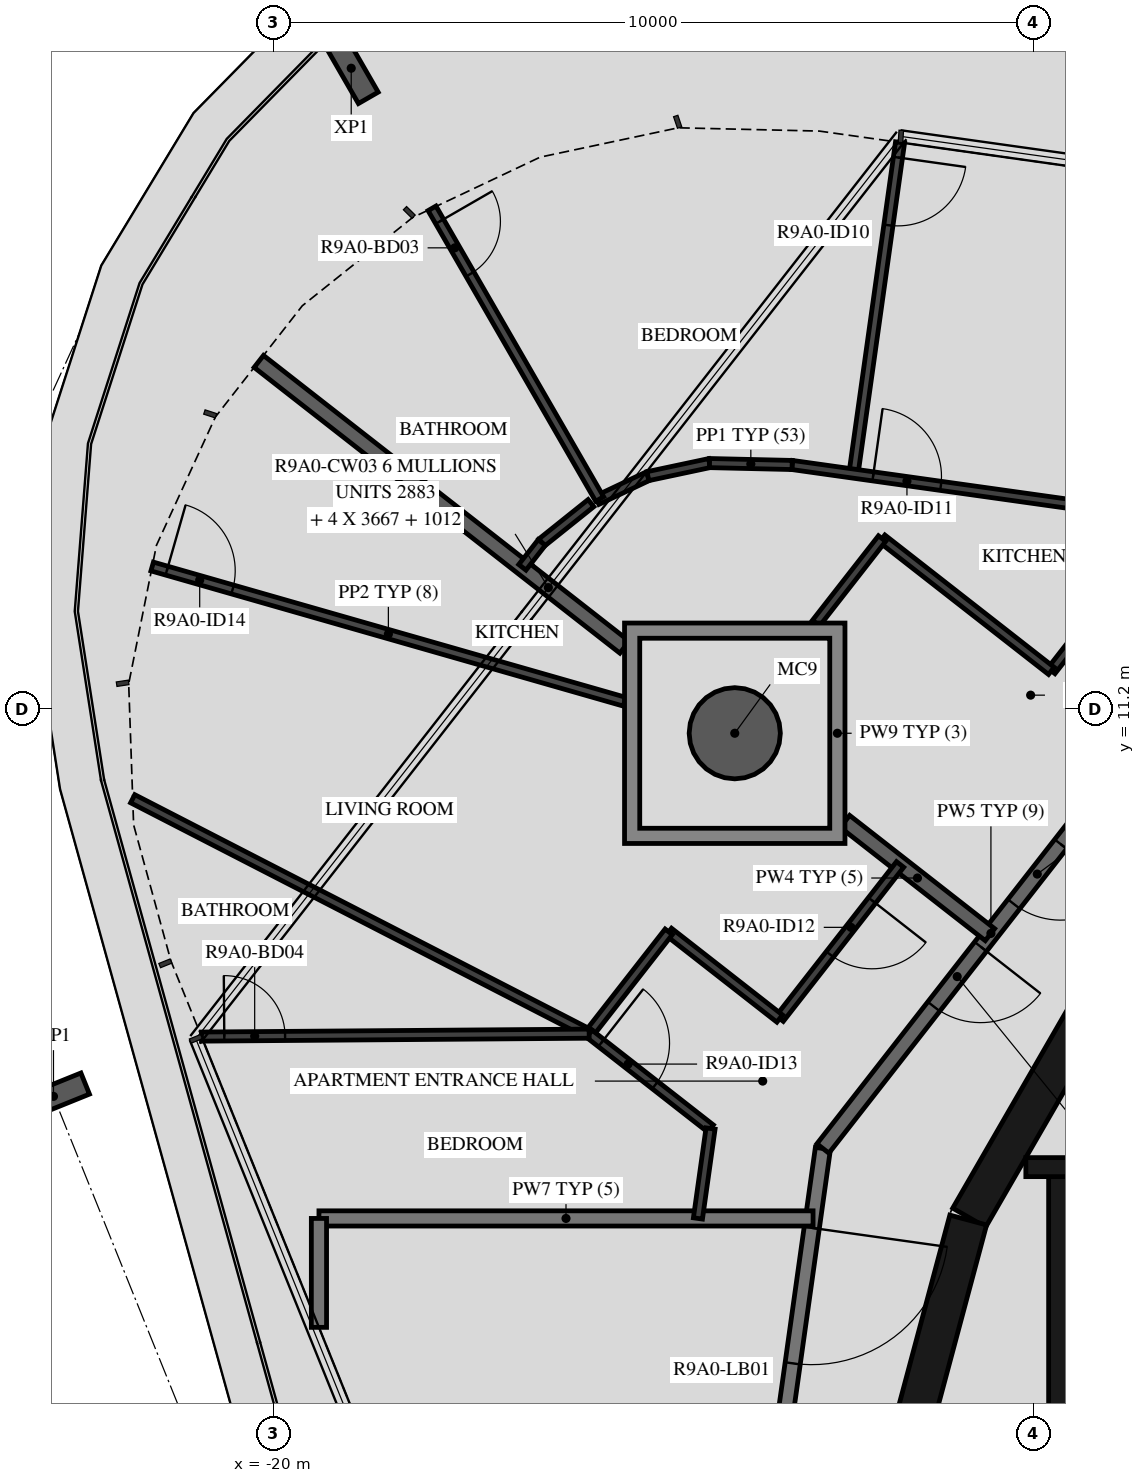
"""IFC4 building model, lengths in metres.
Left out: names, types, materials, properties, quantities, classifications, styles, units other than length and angle.
Written with IfcOpenShell. Run it as: python <this file> out.ifc"""

import sys

from ifc_helpers import new_model, si_unit, direction, frame, frame_2d, origin, origin_2d, place, context, subcontext, project, spatial, polyline, rectangle, hollow_circle, i_section, outline, extrude, element, fill, save


model = new_model("IFC4")
c1 = context("Model", 3, precision=1e-05, world=origin(), true_north=direction((0.0, 1.0)))
c2 = subcontext(c1, "Body", "Model", "MODEL_VIEW")
j1 = project(units=[si_unit("LENGTHUNIT", "METRE"), si_unit("PLANEANGLEUNIT", "RADIAN")], contexts=[c1])
p1 = place(None, origin())
s1 = spatial("IfcSite", under=j1, at=p1, CompositionType="ELEMENT")
p2 = place(p1, origin())
s2 = spatial("IfcBuilding", under=s1, at=p2, CompositionType="ELEMENT")
p3 = place(p2, frame((0.0, 0.0, 333.0)))
s3 = spatial("IfcBuildingStorey", under=s2, at=p3, CompositionType="ELEMENT", Elevation=333.0)
p4 = place(p3, frame((-13.929, 10.883, -0.45), z_axis=(0.0, 0.0, 1.0), x_axis=(1.0, 0.0, 0.0)))
e1 = element("IfcColumn", 1, at=p4, inside=s3, PredefinedType="COLUMN", context=c2, shape_type="SweptSolid", body=[
    extrude(hollow_circle(Radius=0.6, WallThickness=0.03, at=origin_2d()), origin(), (0.0, 0.0, 1.0), 3.57),
])
for number, where, z_axis, x_axis in (
    (2, (-18.976, 19.632, -0.45), (0.0, 0.0, 1.0), (0.866, 0.5, 0.0)),
    (3, (-22.893, 6.106, -0.45), (0.0, 0.0, 1.0), (-0.375, 0.927, 0.0)),
):
    element("IfcColumn", number, at=place(p3, frame(where, z_axis=z_axis, x_axis=x_axis)), inside=s3, PredefinedType="COLUMN", context=c2, shape_type="SweptSolid", body=[
        extrude(i_section(OverallWidth=0.3, OverallDepth=0.9, WebThickness=0.019, FlangeThickness=0.035, FilletRadius=0.03, at=origin_2d()), origin(), (0.0, 0.0, 1.0), 3.57),
    ])
for number, where, z_axis, x_axis in (
    (4, (-9.329, 7.137, 0.0), (0.0, 0.0, 1.0), (-0.5, -0.866, 0.0)),
    (5, (-10.858, 4.479, 0.0), (0.0, 0.0, 1.0), (-0.259, -0.966, 0.0)),
):
    element("IfcWall", number, at=place(p3, frame(where, z_axis=z_axis, x_axis=x_axis)), inside=s3, PredefinedType="SHEAR", context=c2, shape_type="SweptSolid", body=[
        extrude(rectangle(XDim=3.033, YDim=0.5, at=frame_2d((1.516, 0.0))), origin(), (0.0, 0.0, 1.0), 3.12),
    ])
p5 = place(p3, frame((-7.0, 5.175, 0.0), z_axis=(0.0, 0.0, 1.0), x_axis=(-1.0, 0.0, 0.0)))
e6 = element("IfcWall", 6, at=p5, inside=s3, PredefinedType="SHEAR", context=c2, shape_type="SweptSolid", body=[
    extrude(rectangle(XDim=3.1, YDim=0.25, at=frame_2d((1.55, 0.0))), origin(), (0.0, 0.0, 1.0), 3.12),
])
p6 = place(p3, origin())
e7 = element("IfcWall", 7, at=p6, inside=s3, PredefinedType="SHEAR", context=c2, shape_type="SweptSolid", body=[
    extrude(outline(polyline([(-9.8, 1.9), (-9.55, 1.9), (-9.55, 4.8), (-3.35, 4.8), (-3.35, 1.9), (-3.1, 1.9), (-3.1, 4.8), (3.1, 4.8), (3.1, 1.9), (3.35, 1.9), (3.35, 4.8), (5.25, 4.8), (5.25, 1.9), (5.5, 1.9), (5.5, 4.8), (7.4, 4.8), (7.4, 1.9), (7.65, 1.9), (7.65, 4.8), (9.55, 4.8), (9.55, 1.9), (9.8, 1.9), (9.8, 4.8), (9.8, 5.05), (-9.8, 5.05), (-9.8, 4.8), (-9.8, 1.9)])), origin(), (0.0, 0.0, 1.0), 3.12),
])
p7 = place(p3, frame((-12.77, 5.42, 0.0), z_axis=(0.0, 0.0, 1.0), x_axis=(-0.139155334385, -0.990270565508, 0.0)))
e8 = element("IfcWall", 8, at=p7, inside=s3, PredefinedType="STANDARD", context=c2, shape_type="SweptSolid", body=[
    extrude(rectangle(XDim=7.181, YDim=0.2, at=frame_2d((3.59, 0.0))), origin(), (0.0, 0.0, 1.0), 3.12),
])
p8 = place(p7, frame((1.055, 0.0, 0.0)))
e9 = element("IfcOpeningElement", 9, at=p8, cuts=e8, PredefinedType="OPENING", context=c2, shape_type="SweptSolid", body=[
    extrude(rectangle(XDim=1.8, YDim=2.1, at=frame_2d((0.9, 1.05))), frame((0.0, 0.11, 0.0), z_axis=(0.0, -1.0, 0.0), x_axis=(1.0, 0.0, 0.0)), (0.0, 0.0, 1.0), 0.22),
])
p9 = place(p3, frame((-8.349, 11.079, 0.0), z_axis=(0.0, 0.0, 1.0), x_axis=(-0.615669112324, -0.78800478687, 0.0)))
e10 = element("IfcWall", 10, at=p9, inside=s3, PredefinedType="STANDARD", context=c2, shape_type="SweptSolid", body=[
    extrude(rectangle(XDim=7.181, YDim=0.2, at=frame_2d((3.591, 0.0))), origin(), (0.0, 0.0, 1.0), 3.12),
])
p10 = place(p9, frame((2.1, 0.0, 0.0)))
e11 = element("IfcOpeningElement", 11, at=p10, cuts=e10, PredefinedType="OPENING", context=c2, shape_type="SweptSolid", body=[
    extrude(rectangle(XDim=1.0, YDim=2.1, at=frame_2d((0.5, 1.05))), frame((0.0, 0.11, 0.0), z_axis=(0.0, -1.0, 0.0), x_axis=(1.0, 0.0, 0.0)), (0.0, 0.0, 1.0), 0.22),
])
p11 = place(p9, frame((3.811, 0.0, 0.0)))
e12 = element("IfcOpeningElement", 12, at=p11, cuts=e10, PredefinedType="OPENING", context=c2, shape_type="SweptSolid", body=[
    extrude(rectangle(XDim=1.0, YDim=2.1, at=frame_2d((0.5, 1.05))), frame((0.0, 0.11, 0.0), z_axis=(0.0, -1.0, 0.0), x_axis=(1.0, 0.0, 0.0)), (0.0, 0.0, 1.0), 0.22),
])
p12 = place(p3, frame((-12.899, 4.5, 0.0), z_axis=(0.0, 0.0, 1.0), x_axis=(-1.0, 0.0, 0.0)))
e13 = element("IfcWall", 13, at=p12, inside=s3, PredefinedType="STANDARD", context=c2, shape_type="SweptSolid", body=[
    extrude(rectangle(XDim=6.5, YDim=0.2, at=frame_2d((3.25, 0.0))), origin(), (0.0, 0.0, 1.0), 3.12),
])
p13 = place(p3, frame((-19.4, 4.5, 0.0), z_axis=(0.0, 0.0, 1.0), x_axis=(0.0, -1.0, 0.0)))
e14 = element("IfcWall", 14, at=p13, inside=s3, PredefinedType="STANDARD", context=c2, shape_type="SweptSolid", body=[
    extrude(rectangle(XDim=1.433, YDim=0.2, at=frame_2d((0.716, 0.0))), origin(), (0.0, 0.0, 1.0), 3.12),
])
p14 = place(p3, frame((-12.479, 9.723, 0.0), z_axis=(0.0, 0.0, 1.0), x_axis=(0.788030490991, -0.615636211792, 0.0)))
e15 = element("IfcWall", 15, at=p14, inside=s3, PredefinedType="STANDARD", context=c2, shape_type="SweptSolid", body=[
    extrude(rectangle(XDim=2.42, YDim=0.2, at=frame_2d((1.21, 0.0))), origin(), (0.0, 0.0, 1.0), 3.12),
])
p15 = place(p3, frame((-20.191, 15.775, 0.0), z_axis=(0.0, 0.0, 1.0), x_axis=(0.788021948923, -0.615647145706, 0.0)))
e16 = element("IfcWall", 16, at=p15, inside=s3, PredefinedType="STANDARD", context=c2, shape_type="SweptSolid", body=[
    extrude(rectangle(XDim=6.106, YDim=0.2, at=frame_2d((3.053, 0.0))), origin(), (0.0, 0.0, 1.0), 3.12),
])
p16 = place(p3, frame((-9.283, 12.319, 0.0), z_axis=(0.0, 0.0, 1.0), x_axis=(-0.615735018346, -0.787953289975, 0.0)))
e17 = element("IfcWall", 17, at=p16, inside=s3, PredefinedType="PARTITIONING", context=c2, shape_type="SweptSolid", body=[
    extrude(rectangle(XDim=0.781, YDim=0.12, at=frame_2d((0.391, 0.0))), origin(), (0.0, 0.0, 1.0), 3.12),
])
p17 = place(p3, frame((-9.764, 11.704, 0.0), z_axis=(0.0, 0.0, 1.0), x_axis=(-0.787996873396, 0.615679240772, 0.0)))
e18 = element("IfcWall", 18, at=p17, inside=s3, PredefinedType="PARTITIONING", context=c2, shape_type="SweptSolid", body=[
    extrude(rectangle(XDim=2.826, YDim=0.12, at=frame_2d((1.413, 0.0))), origin(), (0.0, 0.0, 1.0), 3.12),
])
p18 = place(p3, frame((-11.992, 13.444, 0.0), z_axis=(0.0, 0.0, 1.0), x_axis=(-0.615593635541, -0.788063751153, 0.0)))
e19 = element("IfcWall", 19, at=p18, inside=s3, PredefinedType="PARTITIONING", context=c2, shape_type="SweptSolid", body=[
    extrude(rectangle(XDim=1.41, YDim=0.12, at=frame_2d((0.705, 0.0))), origin(), (0.0, 0.0, 1.0), 3.12),
])
p19 = place(p3, frame((-11.755, 18.656, 0.0), z_axis=(0.0, 0.0, 1.0), x_axis=(-0.13916046232, -0.990269844904, 0.0)))
e20 = element("IfcWall", 20, at=p19, inside=s3, PredefinedType="PARTITIONING", context=c2, shape_type="SweptSolid", body=[
    extrude(rectangle(XDim=4.4, YDim=0.12, at=frame_2d((2.2, 0.0))), origin(), (0.0, 0.0, 1.0), 2.73),
])
p20 = place(p19, frame((0.2, 0.0, 0.0)))
e21 = element("IfcOpeningElement", 21, at=p20, cuts=e20, PredefinedType="OPENING", context=c2, shape_type="SweptSolid", body=[
    extrude(rectangle(XDim=0.9, YDim=2.1, at=frame_2d((0.45, 1.05))), frame((0.0, 0.07, 0.0), z_axis=(0.0, -1.0, 0.0), x_axis=(1.0, 0.0, 0.0)), (0.0, 0.0, 1.0), 0.14),
])
p21 = place(p3, frame((-13.175, 14.412, 0.0), z_axis=(0.0, 0.0, 1.0), x_axis=(0.990264549393, -0.139198140128, 0.0)))
e22 = element("IfcWall", 22, at=p21, inside=s3, PredefinedType="PARTITIONING", context=c2, shape_type="SweptSolid", body=[
    extrude(rectangle(XDim=6.796, YDim=0.12, at=frame_2d((3.398, 0.0))), origin(), (0.0, 0.0, 1.0), 3.12),
])
p22 = place(p21, frame((1.075, 0.0, 0.0)))
e23 = element("IfcOpeningElement", 23, at=p22, cuts=e22, PredefinedType="OPENING", context=c2, shape_type="SweptSolid", body=[
    extrude(rectangle(XDim=0.9, YDim=2.1, at=frame_2d((0.45, 1.05))), frame((0.0, 0.07, 0.0), z_axis=(0.0, -1.0, 0.0), x_axis=(1.0, 0.0, 0.0)), (0.0, 0.0, 1.0), 0.14),
])
p23 = place(p3, frame((-15.743, 13.948, 0.0), z_axis=(0.0, 0.0, 1.0), x_axis=(0.903885078158, 0.427775368019, 0.0)))
e24 = element("IfcWall", 24, at=p23, inside=s3, PredefinedType="PARTITIONING", context=c2, shape_type="SweptSolid", body=[
    extrude(rectangle(XDim=0.742, YDim=0.12, at=frame_2d((0.371, 0.0))), origin(), (0.0, 0.0, 1.0), 3.12),
])
p24 = place(p3, frame((-15.072, 14.265, 0.0), z_axis=(0.0, 0.0, 1.0), x_axis=(0.978141630921, 0.207939774595, 0.0)))
e25 = element("IfcWall", 25, at=p24, inside=s3, PredefinedType="PARTITIONING", context=c2, shape_type="SweptSolid", body=[
    extrude(rectangle(XDim=0.829, YDim=0.12, at=frame_2d((0.415, 0.0))), origin(), (0.0, 0.0, 1.0), 3.12),
])
p25 = place(p3, frame((-14.261, 14.438, 0.0), z_axis=(0.0, 0.0, 1.0), x_axis=(0.999732237365, -0.023139869764, 0.0)))
e26 = element("IfcWall", 26, at=p25, inside=s3, PredefinedType="PARTITIONING", context=c2, shape_type="SweptSolid", body=[
    extrude(rectangle(XDim=1.087, YDim=0.12, at=frame_2d((0.543, 0.0))), origin(), (0.0, 0.0, 1.0), 3.12),
])
p26 = place(p3, frame((-17.912, 17.789, 0.0), z_axis=(0.0, 0.0, 1.0), x_axis=(0.499601164034, -0.866255549417, 0.0)))
e27 = element("IfcWall", 27, at=p26, inside=s3, PredefinedType="PARTITIONING", context=c2, shape_type="SweptSolid", body=[
    extrude(rectangle(XDim=4.415, YDim=0.12, at=frame_2d((2.207, 0.0))), origin(), (0.0, 0.0, 1.0), 2.73),
])
p27 = place(p26, frame((0.2, 0.0, 0.0)))
e28 = element("IfcOpeningElement", 28, at=p27, cuts=e27, PredefinedType="OPENING", context=c2, shape_type="SweptSolid", body=[
    extrude(rectangle(XDim=0.8, YDim=2.1, at=frame_2d((0.4, 1.05))), frame((0.0, 0.07, 0.0), z_axis=(0.0, -1.0, 0.0), x_axis=(1.0, 0.0, 0.0)), (0.0, 0.0, 1.0), 0.14),
])
p28 = place(p3, frame((-15.821, 13.91, 0.0), z_axis=(0.0, 0.0, 1.0), x_axis=(-0.780840072472, -0.624730967074, 0.0)))
e29 = element("IfcWall", 29, at=p28, inside=s3, PredefinedType="PARTITIONING", context=c2, shape_type="SweptSolid", body=[
    extrude(rectangle(XDim=0.829, YDim=0.12, at=frame_2d((0.415, 0.0))), origin(), (0.0, 0.0, 1.0), 3.12),
])
p29 = place(p3, frame((-16.469, 13.393, 0.0), z_axis=(0.0, 0.0, 1.0), x_axis=(-0.615815563257, -0.787890342656, 0.0)))
e30 = element("IfcWall", 30, at=p29, inside=s3, PredefinedType="PARTITIONING", context=c2, shape_type="SweptSolid", body=[
    extrude(rectangle(XDim=0.414, YDim=0.12, at=frame_2d((0.207, 0.0))), origin(), (0.0, 0.0, 1.0), 3.12),
])
p30 = place(p3, frame((-11.754, 9.157, 0.0), z_axis=(0.0, 0.0, 1.0), x_axis=(-0.615568539365, -0.788083354312, 0.0)))
e31 = element("IfcWall", 31, at=p30, inside=s3, PredefinedType="PARTITIONING", context=c2, shape_type="SweptSolid", body=[
    extrude(rectangle(XDim=2.573, YDim=0.12, at=frame_2d((1.286, 0.0))), origin(), (0.0, 0.0, 1.0), 3.12),
])
p31 = place(p30, frame((0.6, 0.0, 0.0)))
e32 = element("IfcOpeningElement", 32, at=p31, cuts=e31, PredefinedType="OPENING", context=c2, shape_type="SweptSolid", body=[
    extrude(rectangle(XDim=0.9, YDim=2.1, at=frame_2d((0.45, 1.05))), frame((0.0, 0.07, 0.0), z_axis=(0.0, -1.0, 0.0), x_axis=(1.0, 0.0, 0.0)), (0.0, 0.0, 1.0), 0.14),
])
p32 = place(p3, frame((-13.338, 7.129, 0.0), z_axis=(0.0, 0.0, 1.0), x_axis=(-0.787938483233, 0.615753965997, 0.0)))
e33 = element("IfcWall", 33, at=p32, inside=s3, PredefinedType="PARTITIONING", context=c2, shape_type="SweptSolid", body=[
    extrude(rectangle(XDim=1.853, YDim=0.12, at=frame_2d((0.927, 0.0))), origin(), (0.0, 0.0, 1.0), 3.12),
])
p33 = place(p3, frame((-14.798, 8.271, 0.0), z_axis=(0.0, 0.0, 1.0), x_axis=(-0.615669123866, -0.788004777852, 0.0)))
e34 = element("IfcWall", 34, at=p33, inside=s3, PredefinedType="PARTITIONING", context=c2, shape_type="SweptSolid", body=[
    extrude(rectangle(XDim=1.7, YDim=0.12, at=frame_2d((0.85, 0.0))), origin(), (0.0, 0.0, 1.0), 3.12),
])
p34 = place(p3, frame((-15.845, 6.931, 0.0), z_axis=(0.0, 0.0, 1.0), x_axis=(0.787962283792, -0.615723508827, 0.0)))
e35 = element("IfcWall", 35, at=p34, inside=s3, PredefinedType="PARTITIONING", context=c2, shape_type="SweptSolid", body=[
    extrude(rectangle(XDim=2.027, YDim=0.12, at=frame_2d((1.013, 0.0))), origin(), (0.0, 0.0, 1.0), 3.12),
])
p35 = place(p34, frame((0.2, 0.0, 0.0)))
e36 = element("IfcOpeningElement", 36, at=p35, cuts=e35, PredefinedType="OPENING", context=c2, shape_type="SweptSolid", body=[
    extrude(rectangle(XDim=0.9, YDim=2.1, at=frame_2d((0.45, 1.05))), frame((0.0, 0.07, 0.0), z_axis=(0.0, -1.0, 0.0), x_axis=(1.0, 0.0, 0.0)), (0.0, 0.0, 1.0), 0.14),
])
p36 = place(p3, frame((-14.248, 5.683, 0.0), z_axis=(0.0, 0.0, 1.0), x_axis=(-0.139189066398, -0.990265824814, 0.0)))
e37 = element("IfcWall", 37, at=p36, inside=s3, PredefinedType="PARTITIONING", context=c2, shape_type="SweptSolid", body=[
    extrude(rectangle(XDim=1.195, YDim=0.12, at=frame_2d((0.597, 0.0))), origin(), (0.0, 0.0, 1.0), 3.12),
])
p37 = place(p3, frame((-21.594, 13.077, 0.0), z_axis=(0.0, 0.0, 1.0), x_axis=(0.961389857774, -0.275190009576, 0.0)))
e38 = element("IfcWall", 38, at=p37, inside=s3, PredefinedType="PARTITIONING", context=c2, shape_type="SweptSolid", body=[
    extrude(rectangle(XDim=6.464, YDim=0.12, at=frame_2d((3.232, 0.0))), origin(), (0.0, 0.0, 1.0), 2.73),
])
p38 = place(p37, frame((0.2, 0.0, 0.0)))
e39 = element("IfcOpeningElement", 39, at=p38, cuts=e38, PredefinedType="OPENING", context=c2, shape_type="SweptSolid", body=[
    extrude(rectangle(XDim=0.9, YDim=2.1, at=frame_2d((0.45, 1.05))), frame((0.0, 0.07, 0.0), z_axis=(0.0, -1.0, 0.0), x_axis=(1.0, 0.0, 0.0)), (0.0, 0.0, 1.0), 0.14),
])
p39 = place(p3, frame((-21.85, 10.021, 0.0), z_axis=(0.0, 0.0, 1.0), x_axis=(0.889153763622, -0.457608549567, 0.0)))
e40 = element("IfcWall", 40, at=p39, inside=s3, PredefinedType="PARTITIONING", context=c2, shape_type="SweptSolid", body=[
    extrude(rectangle(XDim=6.754, YDim=0.12, at=frame_2d((3.377, 0.0))), origin(), (0.0, 0.0, 1.0), 3.12),
])
p40 = place(p3, frame((-20.946, 6.892, 0.0), z_axis=(0.0, 0.0, 1.0), x_axis=(0.999971403985, 0.007562487164, 0.0)))
e41 = element("IfcWall", 41, at=p40, inside=s3, PredefinedType="PARTITIONING", context=c2, shape_type="SweptSolid", body=[
    extrude(rectangle(XDim=5.101, YDim=0.12, at=frame_2d((2.55, 0.0))), origin(), (0.0, 0.0, 1.0), 3.12),
])
p41 = place(p40, frame((0.3, 0.0, 0.0)))
e42 = element("IfcOpeningElement", 42, at=p41, cuts=e41, PredefinedType="OPENING", context=c2, shape_type="SweptSolid", body=[
    extrude(rectangle(XDim=0.8, YDim=2.1, at=frame_2d((0.4, 1.05))), frame((0.0, 0.07, 0.0), z_axis=(0.0, -1.0, 0.0), x_axis=(1.0, 0.0, 0.0)), (0.0, 0.0, 1.0), 0.14),
])
p42 = place(p3, origin())
e43 = element("IfcWall", 43, at=p42, inside=s3, PredefinedType="STANDARD", context=c2, shape_type="SweptSolid", body=[
    extrude(outline(polyline([(-12.479, 12.333), (-12.479, 9.433), (-15.379, 9.433), (-15.379, 12.333), (-12.479, 12.333)]), holes=[polyline([(-15.179, 9.633), (-12.679, 9.633), (-12.679, 12.133), (-15.179, 12.133), (-15.179, 9.633)])]), origin(), (0.0, 0.0, 1.0), 3.12),
])
p43 = place(p10, origin())
e44 = element("IfcDoor", 44, at=p43, inside=s3, OperationType="SINGLE_SWING_RIGHT", PredefinedType="DOOR", context=c2, shape_type="SweptSolid", body=[
    extrude(rectangle(XDim=1.0, YDim=2.1, at=frame_2d((0.5, 1.05))), frame((0.0, 0.025, 0.0), z_axis=(0.0, -1.0, 0.0), x_axis=(1.0, 0.0, 0.0)), (0.0, 0.0, 1.0), 0.05),
])
fill(e11, e44)
p44 = place(p20, origin())
e45 = element("IfcDoor", 45, at=p44, inside=s3, OperationType="SINGLE_SWING_RIGHT", PredefinedType="DOOR", context=c2, shape_type="SweptSolid", body=[
    extrude(rectangle(XDim=0.9, YDim=2.1, at=frame_2d((0.45, 1.05))), frame((0.0, 0.025, 0.0), z_axis=(0.0, -1.0, 0.0), x_axis=(1.0, 0.0, 0.0)), (0.0, 0.0, 1.0), 0.05),
])
fill(e21, e45)
p45 = place(p27, origin())
e46 = element("IfcDoor", 46, at=p45, inside=s3, OperationType="SINGLE_SWING_RIGHT", PredefinedType="DOOR", context=c2, shape_type="SweptSolid", body=[
    extrude(rectangle(XDim=0.8, YDim=2.1, at=frame_2d((0.4, 1.05))), frame((0.0, 0.025, 0.0), z_axis=(0.0, -1.0, 0.0), x_axis=(1.0, 0.0, 0.0)), (0.0, 0.0, 1.0), 0.05),
])
fill(e28, e46)
p46 = place(p22, origin())
e47 = element("IfcDoor", 47, at=p46, inside=s3, OperationType="SINGLE_SWING_LEFT", PredefinedType="DOOR", context=c2, shape_type="SweptSolid", body=[
    extrude(rectangle(XDim=0.9, YDim=2.1, at=frame_2d((0.45, 1.05))), frame((0.0, 0.025, 0.0), z_axis=(0.0, -1.0, 0.0), x_axis=(1.0, 0.0, 0.0)), (0.0, 0.0, 1.0), 0.05),
])
fill(e23, e47)
p47 = place(p11, origin())
e48 = element("IfcDoor", 48, at=p47, inside=s3, OperationType="SINGLE_SWING_LEFT", PredefinedType="DOOR", context=c2, shape_type="SweptSolid", body=[
    extrude(rectangle(XDim=1.0, YDim=2.1, at=frame_2d((0.5, 1.05))), frame((0.0, 0.025, 0.0), z_axis=(0.0, -1.0, 0.0), x_axis=(1.0, 0.0, 0.0)), (0.0, 0.0, 1.0), 0.05),
])
fill(e12, e48)
p48 = place(p31, origin())
e49 = element("IfcDoor", 49, at=p48, inside=s3, OperationType="SINGLE_SWING_LEFT", PredefinedType="DOOR", context=c2, shape_type="SweptSolid", body=[
    extrude(rectangle(XDim=0.9, YDim=2.1, at=frame_2d((0.45, 1.05))), frame((0.0, 0.025, 0.0), z_axis=(0.0, -1.0, 0.0), x_axis=(1.0, 0.0, 0.0)), (0.0, 0.0, 1.0), 0.05),
])
fill(e32, e49)
p49 = place(p35, origin())
e50 = element("IfcDoor", 50, at=p49, inside=s3, OperationType="SINGLE_SWING_LEFT", PredefinedType="DOOR", context=c2, shape_type="SweptSolid", body=[
    extrude(rectangle(XDim=0.9, YDim=2.1, at=frame_2d((0.45, 1.05))), frame((0.0, 0.025, 0.0), z_axis=(0.0, -1.0, 0.0), x_axis=(1.0, 0.0, 0.0)), (0.0, 0.0, 1.0), 0.05),
])
fill(e36, e50)
p50 = place(p38, origin())
e51 = element("IfcDoor", 51, at=p50, inside=s3, OperationType="SINGLE_SWING_LEFT", PredefinedType="DOOR", context=c2, shape_type="SweptSolid", body=[
    extrude(rectangle(XDim=0.9, YDim=2.1, at=frame_2d((0.45, 1.05))), frame((0.0, 0.025, 0.0), z_axis=(0.0, -1.0, 0.0), x_axis=(1.0, 0.0, 0.0)), (0.0, 0.0, 1.0), 0.05),
])
fill(e39, e51)
p51 = place(p41, origin())
e52 = element("IfcDoor", 52, at=p51, inside=s3, OperationType="SINGLE_SWING_LEFT", PredefinedType="DOOR", context=c2, shape_type="SweptSolid", body=[
    extrude(rectangle(XDim=0.8, YDim=2.1, at=frame_2d((0.4, 1.05))), frame((0.0, 0.025, 0.0), z_axis=(0.0, -1.0, 0.0), x_axis=(1.0, 0.0, 0.0)), (0.0, 0.0, 1.0), 0.05),
])
fill(e42, e52)
p52 = place(p8, origin())
e53 = element("IfcDoor", 53, at=p52, inside=s3, OperationType="DOUBLE_DOOR_SINGLE_SWING", PredefinedType="DOOR", context=c2, shape_type="SweptSolid", body=[
    extrude(rectangle(XDim=1.8, YDim=2.1, at=frame_2d((0.9, 1.05))), frame((0.0, 0.025, 0.0), z_axis=(0.0, -1.0, 0.0), x_axis=(1.0, 0.0, 0.0)), (0.0, 0.0, 1.0), 0.05),
])
fill(e9, e53)
save(model, sys.argv[1])
